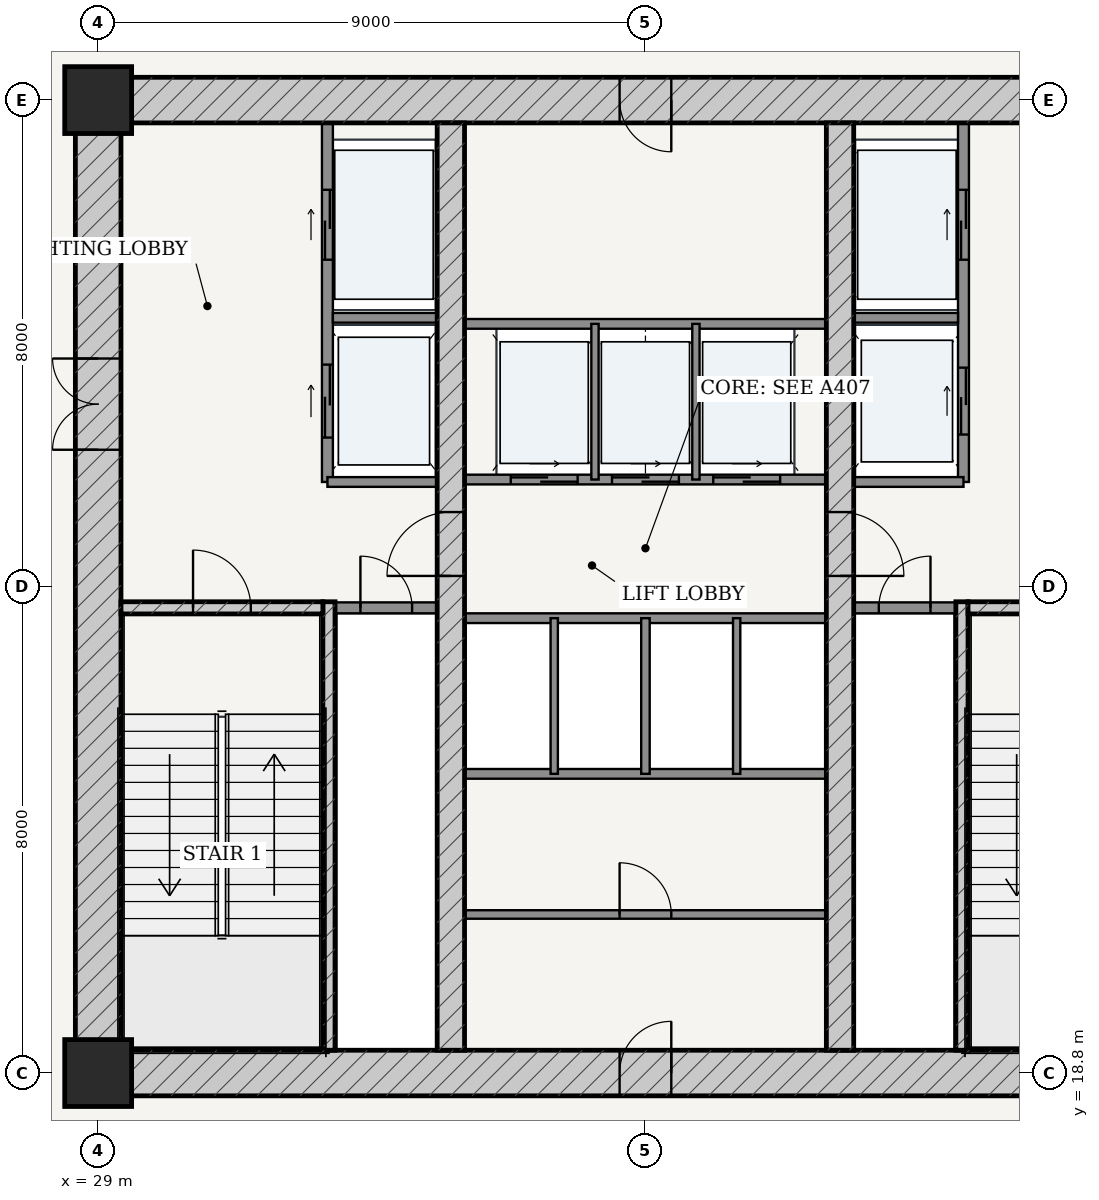
"""IFC4 building model, lengths in metres.
Left out: names, types, materials, properties, quantities, classifications, styles, units other than length and angle.
Written with IfcOpenShell. Run it as: python <this file> out.ifc"""

import sys

from ifc_helpers import new_model, si_unit, direction, frame, frame_2d, origin, origin_2d, place, context, subcontext, project, spatial, rectangle, extrude, source, transform, mapped, element, fill, save


model = new_model("IFC4")
c1 = context("Model", 3, precision=1e-05, world=origin(), true_north=direction((-0.2419218956, 0.970295726276)))
c2 = subcontext(c1, "Body", "Model", "MODEL_VIEW")
j1 = project(units=[si_unit("LENGTHUNIT", "METRE"), si_unit("PLANEANGLEUNIT", "RADIAN")], contexts=[c1])
p1 = place(None, origin())
s1 = spatial("IfcSite", under=j1, at=p1, CompositionType="ELEMENT")
p2 = place(p1, origin())
s2 = spatial("IfcBuilding", under=s1, at=p2, CompositionType="ELEMENT")
p3 = place(p2, frame((0.0, 0.0, 18.9)))
s3 = spatial("IfcBuildingStorey", under=s2, at=p3, CompositionType="ELEMENT", Elevation=18.9)
for number, where, z_axis, x_axis in (
    (1, (29.0, 18.8, 0.0), (0.0, 0.0, 1.0), (1.0, 0.0, 0.0)),
    (2, (29.0, 34.8, 0.0), (0.0, 0.0, 1.0), (1.0, 0.0, 0.0)),
):
    element("IfcColumn", number, at=place(p3, frame(where, z_axis=z_axis, x_axis=x_axis)), inside=s3, PredefinedType="COLUMN", context=c2, shape_type="SweptSolid", body=[
        extrude(rectangle(XDim=1.1, YDim=1.1, at=origin_2d()), origin(), (0.0, 0.0, 1.0), 5.1),
    ])
p4 = place(p3, frame((28.625, 18.8, 0.0), z_axis=(0.0, 0.0, 1.0), x_axis=(1.0, 0.0, 0.0)))
e3 = element("IfcWall", 3, at=p4, inside=s3, PredefinedType="SHEAR", context=c2, shape_type="SweptSolid", body=[
    extrude(rectangle(XDim=18.75, YDim=0.75, at=frame_2d((9.375, 0.0))), origin(), (0.0, 0.0, 1.0), 4.82),
])
p5 = place(p4, frame((8.95, 0.0, 0.0)))
e4 = element("IfcOpeningElement", 4, at=p5, cuts=e3, PredefinedType="OPENING", context=c2, shape_type="SweptSolid", body=[
    extrude(rectangle(XDim=0.85, YDim=2.1, at=frame_2d((0.425, 1.05))), frame((0.0, 0.385, 0.0), z_axis=(0.0, -1.0, 0.0), x_axis=(1.0, 0.0, 0.0)), (0.0, 0.0, 1.0), 0.77),
])
p6 = place(p3, frame((28.625, 34.8, 0.0), z_axis=(0.0, 0.0, 1.0), x_axis=(1.0, 0.0, 0.0)))
e5 = element("IfcWall", 5, at=p6, inside=s3, PredefinedType="SHEAR", context=c2, shape_type="SweptSolid", body=[
    extrude(rectangle(XDim=18.75, YDim=0.75, at=frame_2d((9.375, 0.0))), origin(), (0.0, 0.0, 1.0), 4.82),
])
p7 = place(p6, frame((8.95, 0.0, 0.0)))
e6 = element("IfcOpeningElement", 6, at=p7, cuts=e5, PredefinedType="OPENING", context=c2, shape_type="SweptSolid", body=[
    extrude(rectangle(XDim=0.85, YDim=2.1, at=frame_2d((0.425, 1.05))), frame((0.0, 0.385, 0.0), z_axis=(0.0, -1.0, 0.0), x_axis=(1.0, 0.0, 0.0)), (0.0, 0.0, 1.0), 0.77),
])
p8 = place(p3, frame((29.0, 19.175, 0.0), z_axis=(0.0, 0.0, 1.0), x_axis=(0.0, 1.0, 0.0)))
e7 = element("IfcWall", 7, at=p8, inside=s3, PredefinedType="SHEAR", context=c2, shape_type="SweptSolid", body=[
    extrude(rectangle(XDim=15.25, YDim=0.75, at=frame_2d((7.625, 0.0))), origin(), (0.0, 0.0, 1.0), 4.82),
])
p9 = place(p8, frame((9.875, 0.0, 0.0)))
e8 = element("IfcOpeningElement", 8, at=p9, cuts=e7, PredefinedType="OPENING", context=c2, shape_type="SweptSolid", body=[
    extrude(rectangle(XDim=1.5, YDim=2.2, at=frame_2d((0.75, 1.1))), frame((0.0, 0.385, 0.0), z_axis=(0.0, -1.0, 0.0), x_axis=(1.0, 0.0, 0.0)), (0.0, 0.0, 1.0), 0.77),
])
p10 = place(p3, frame((32.795, 19.175, 0.0), z_axis=(0.0, 0.0, 1.0), x_axis=(0.0, 1.0, 0.0)))
e9 = element("IfcWall", 9, at=p10, inside=s3, PredefinedType="SOLIDWALL", context=c2, shape_type="SweptSolid", body=[
    extrude(rectangle(XDim=7.375, YDim=0.2, at=frame_2d((3.688, 0.0))), origin(), (0.0, 0.0, 1.0), 4.82),
])
p11 = place(p3, frame((29.375, 26.45, 0.0), z_axis=(0.0, 0.0, 1.0), x_axis=(1.0, 0.0, 0.0)))
e10 = element("IfcWall", 10, at=p11, inside=s3, PredefinedType="SOLIDWALL", context=c2, shape_type="SweptSolid", body=[
    extrude(rectangle(XDim=3.32, YDim=0.2, at=frame_2d((1.66, 0.0))), origin(), (0.0, 0.0, 1.0), 4.82),
])
p12 = place(p11, frame((1.185, 0.0, 0.0)))
e11 = element("IfcOpeningElement", 11, at=p12, cuts=e10, PredefinedType="OPENING", context=c2, shape_type="SweptSolid", body=[
    extrude(rectangle(XDim=0.95, YDim=2.15, at=frame_2d((0.475, 1.075))), frame((0.0, 0.11, 0.0), z_axis=(0.0, -1.0, 0.0), x_axis=(1.0, 0.0, 0.0)), (0.0, 0.0, 1.0), 0.22),
])
p13 = place(p3, frame((43.205, 19.175, 0.0), z_axis=(0.0, 0.0, 1.0), x_axis=(0.0, 1.0, 0.0)))
e12 = element("IfcWall", 12, at=p13, inside=s3, PredefinedType="SOLIDWALL", context=c2, shape_type="SweptSolid", body=[
    extrude(rectangle(XDim=7.375, YDim=0.2, at=frame_2d((3.688, 0.0))), origin(), (0.0, 0.0, 1.0), 4.82),
])
p14 = place(p3, frame((43.305, 26.45, 0.0), z_axis=(0.0, 0.0, 1.0), x_axis=(1.0, 0.0, 0.0)))
e13 = element("IfcWall", 13, at=p14, inside=s3, PredefinedType="SOLIDWALL", context=c2, shape_type="SweptSolid", body=[
    extrude(rectangle(XDim=3.32, YDim=0.2, at=frame_2d((1.66, 0.0))), origin(), (0.0, 0.0, 1.0), 4.82),
])
p15 = place(p14, frame((1.185, 0.0, 0.0)))
e14 = element("IfcOpeningElement", 14, at=p15, cuts=e13, PredefinedType="OPENING", context=c2, shape_type="SweptSolid", body=[
    extrude(rectangle(XDim=0.95, YDim=2.15, at=frame_2d((0.475, 1.075))), frame((0.0, 0.11, 0.0), z_axis=(0.0, -1.0, 0.0), x_axis=(1.0, 0.0, 0.0)), (0.0, 0.0, 1.0), 0.22),
])
p16 = place(p3, frame((34.8, 19.175, 0.0), z_axis=(0.0, 0.0, 1.0), x_axis=(0.0, 1.0, 0.0)))
e15 = element("IfcWall", 15, at=p16, inside=s3, PredefinedType="SHEAR", context=c2, shape_type="SweptSolid", body=[
    extrude(rectangle(XDim=15.25, YDim=0.45, at=frame_2d((7.625, 0.0))), origin(), (0.0, 0.0, 1.0), 4.82),
])
p17 = place(p16, frame((7.8, 0.0, 0.0)))
e16 = element("IfcOpeningElement", 16, at=p17, cuts=e15, PredefinedType="OPENING", context=c2, shape_type="SweptSolid", body=[
    extrude(rectangle(XDim=1.05, YDim=2.15, at=frame_2d((0.525, 1.075))), frame((0.0, 0.235, 0.0), z_axis=(0.0, -1.0, 0.0), x_axis=(1.0, 0.0, 0.0)), (0.0, 0.0, 1.0), 0.47),
])
p18 = place(p3, frame((41.2, 19.175, 0.0), z_axis=(0.0, 0.0, 1.0), x_axis=(0.0, 1.0, 0.0)))
e17 = element("IfcWall", 17, at=p18, inside=s3, PredefinedType="SHEAR", context=c2, shape_type="SweptSolid", body=[
    extrude(rectangle(XDim=15.25, YDim=0.45, at=frame_2d((7.625, 0.0))), origin(), (0.0, 0.0, 1.0), 4.82),
])
p19 = place(p18, frame((7.8, 0.0, 0.0)))
e18 = element("IfcOpeningElement", 18, at=p19, cuts=e17, PredefinedType="OPENING", context=c2, shape_type="SweptSolid", body=[
    extrude(rectangle(XDim=1.05, YDim=2.15, at=frame_2d((0.525, 1.075))), frame((0.0, 0.235, 0.0), z_axis=(0.0, -1.0, 0.0), x_axis=(1.0, 0.0, 0.0)), (0.0, 0.0, 1.0), 0.47),
])
p20 = place(p3, frame((32.9, 26.45, 0.0), z_axis=(0.0, 0.0, 1.0), x_axis=(1.0, 0.0, 0.0)))
e19 = element("IfcWall", 19, at=p20, inside=s3, PredefinedType="PARTITIONING", context=c2, shape_type="SweptSolid", body=[
    extrude(rectangle(XDim=1.675, YDim=0.18, at=frame_2d((0.837, 0.0))), origin(), (0.0, 0.0, 1.0), 4.82),
])
p21 = place(p20, frame((0.413, 0.0, 0.0)))
e20 = element("IfcOpeningElement", 20, at=p21, cuts=e19, PredefinedType="OPENING", context=c2, shape_type="SweptSolid", body=[
    extrude(rectangle(XDim=0.85, YDim=2.1, at=frame_2d((0.425, 1.05))), frame((0.0, 0.1, 0.0), z_axis=(0.0, -1.0, 0.0), x_axis=(1.0, 0.0, 0.0)), (0.0, 0.0, 1.0), 0.2),
])
p22 = place(p3, frame((41.425, 26.45, 0.0), z_axis=(0.0, 0.0, 1.0), x_axis=(1.0, 0.0, 0.0)))
e21 = element("IfcWall", 21, at=p22, inside=s3, PredefinedType="PARTITIONING", context=c2, shape_type="SweptSolid", body=[
    extrude(rectangle(XDim=1.675, YDim=0.18, at=frame_2d((0.837, 0.0))), origin(), (0.0, 0.0, 1.0), 4.82),
])
p23 = place(p22, frame((0.413, 0.0, 0.0)))
e22 = element("IfcOpeningElement", 22, at=p23, cuts=e21, PredefinedType="OPENING", context=c2, shape_type="SweptSolid", body=[
    extrude(rectangle(XDim=0.85, YDim=2.1, at=frame_2d((0.425, 1.05))), frame((0.0, 0.1, 0.0), z_axis=(0.0, -1.0, 0.0), x_axis=(1.0, 0.0, 0.0)), (0.0, 0.0, 1.0), 0.2),
])
p24 = place(p3, frame((32.77, 28.52, 0.0), z_axis=(0.0, 0.0, 1.0), x_axis=(0.0, 1.0, 0.0)))
e23 = element("IfcWall", 23, at=p24, inside=s3, PredefinedType="PARTITIONING", context=c2, shape_type="SweptSolid", body=[
    extrude(rectangle(XDim=5.905, YDim=0.18, at=frame_2d((2.953, 0.0))), origin(), (0.0, 0.0, 1.0), 4.82),
])
p25 = place(p24, frame((3.655, 0.0, 0.0)))
e24 = element("IfcOpeningElement", 24, at=p25, cuts=e23, PredefinedType="OPENING", context=c2, shape_type="SweptSolid", body=[
    extrude(rectangle(XDim=1.15, YDim=2.2, at=frame_2d((0.575, 1.1))), frame((0.0, 0.1, 0.0), z_axis=(0.0, -1.0, 0.0), x_axis=(1.0, 0.0, 0.0)), (0.0, 0.0, 1.0), 0.2),
])
p26 = place(p24, frame((0.73, 0.0, 0.0)))
e25 = element("IfcOpeningElement", 25, at=p26, cuts=e23, PredefinedType="OPENING", context=c2, shape_type="SweptSolid", body=[
    extrude(rectangle(XDim=1.2, YDim=2.25, at=frame_2d((0.6, 1.125))), frame((0.0, 0.1, 0.0), z_axis=(0.0, -1.0, 0.0), x_axis=(1.0, 0.0, 0.0)), (0.0, 0.0, 1.0), 0.2),
])
p27 = place(p3, frame((32.86, 31.22, 0.0), z_axis=(0.0, 0.0, 1.0), x_axis=(1.0, 0.0, 0.0)))
e26 = element("IfcWall", 26, at=p27, inside=s3, PredefinedType="PARTITIONING", context=c2, shape_type="SweptSolid", body=[
    extrude(rectangle(XDim=1.715, YDim=0.16, at=frame_2d((0.857, 0.0))), origin(), (0.0, 0.0, 1.0), 4.82),
])
p28 = place(p3, frame((32.77, 28.52, 0.0), z_axis=(0.0, 0.0, 1.0), x_axis=(1.0, 0.0, 0.0)))
e27 = element("IfcWall", 27, at=p28, inside=s3, PredefinedType="PARTITIONING", context=c2, shape_type="SweptSolid", body=[
    extrude(rectangle(XDim=1.805, YDim=0.16, at=frame_2d((0.902, 0.0))), origin(), (0.0, 0.0, 1.0), 4.82),
])
p29 = place(p3, frame((43.23, 28.52, 0.0), z_axis=(0.0, 0.0, 1.0), x_axis=(0.0, 1.0, 0.0)))
e28 = element("IfcWall", 28, at=p29, inside=s3, PredefinedType="PARTITIONING", context=c2, shape_type="SweptSolid", body=[
    extrude(rectangle(XDim=5.905, YDim=0.18, at=frame_2d((2.953, 0.0))), origin(), (0.0, 0.0, 1.0), 4.82),
])
p30 = place(p29, frame((3.655, 0.0, 0.0)))
e29 = element("IfcOpeningElement", 29, at=p30, cuts=e28, PredefinedType="OPENING", context=c2, shape_type="SweptSolid", body=[
    extrude(rectangle(XDim=1.15, YDim=2.2, at=frame_2d((0.575, 1.1))), frame((0.0, 0.1, 0.0), z_axis=(0.0, -1.0, 0.0), x_axis=(1.0, 0.0, 0.0)), (0.0, 0.0, 1.0), 0.2),
])
p31 = place(p29, frame((0.78, 0.0, 0.0)))
e30 = element("IfcOpeningElement", 30, at=p31, cuts=e28, PredefinedType="OPENING", context=c2, shape_type="SweptSolid", body=[
    extrude(rectangle(XDim=1.1, YDim=2.2, at=frame_2d((0.55, 1.1))), frame((0.0, 0.1, 0.0), z_axis=(0.0, -1.0, 0.0), x_axis=(1.0, 0.0, 0.0)), (0.0, 0.0, 1.0), 0.2),
])
p32 = place(p3, frame((41.425, 31.22, 0.0), z_axis=(0.0, 0.0, 1.0), x_axis=(1.0, 0.0, 0.0)))
e31 = element("IfcWall", 31, at=p32, inside=s3, PredefinedType="PARTITIONING", context=c2, shape_type="SweptSolid", body=[
    extrude(rectangle(XDim=1.715, YDim=0.16, at=frame_2d((0.857, 0.0))), origin(), (0.0, 0.0, 1.0), 4.82),
])
p33 = place(p3, frame((41.425, 28.52, 0.0), z_axis=(0.0, 0.0, 1.0), x_axis=(1.0, 0.0, 0.0)))
e32 = element("IfcWall", 32, at=p33, inside=s3, PredefinedType="PARTITIONING", context=c2, shape_type="SweptSolid", body=[
    extrude(rectangle(XDim=1.805, YDim=0.16, at=frame_2d((0.902, 0.0))), origin(), (0.0, 0.0, 1.0), 4.82),
])
p34 = place(p3, frame((35.025, 28.56, 0.0), z_axis=(0.0, 0.0, 1.0), x_axis=(1.0, 0.0, 0.0)))
e33 = element("IfcWall", 33, at=p34, inside=s3, PredefinedType="PARTITIONING", context=c2, shape_type="SweptSolid", body=[
    extrude(rectangle(XDim=5.95, YDim=0.16, at=frame_2d((2.975, 0.0))), origin(), (0.0, 0.0, 1.0), 4.82),
])
p35 = place(p34, frame((0.76, 0.0, 0.0)))
e34 = element("IfcOpeningElement", 34, at=p35, cuts=e33, PredefinedType="OPENING", context=c2, shape_type="SweptSolid", body=[
    extrude(rectangle(XDim=1.1, YDim=2.2, at=frame_2d((0.55, 1.1))), frame((0.0, 0.09, 0.0), z_axis=(0.0, -1.0, 0.0), x_axis=(1.0, 0.0, 0.0)), (0.0, 0.0, 1.0), 0.18),
])
p36 = place(p34, frame((2.425, 0.0, 0.0)))
e35 = element("IfcOpeningElement", 35, at=p36, cuts=e33, PredefinedType="OPENING", context=c2, shape_type="SweptSolid", body=[
    extrude(rectangle(XDim=1.1, YDim=2.2, at=frame_2d((0.55, 1.1))), frame((0.0, 0.09, 0.0), z_axis=(0.0, -1.0, 0.0), x_axis=(1.0, 0.0, 0.0)), (0.0, 0.0, 1.0), 0.18),
])
p37 = place(p34, frame((4.09, 0.0, 0.0)))
e36 = element("IfcOpeningElement", 36, at=p37, cuts=e33, PredefinedType="OPENING", context=c2, shape_type="SweptSolid", body=[
    extrude(rectangle(XDim=1.1, YDim=2.2, at=frame_2d((0.55, 1.1))), frame((0.0, 0.09, 0.0), z_axis=(0.0, -1.0, 0.0), x_axis=(1.0, 0.0, 0.0)), (0.0, 0.0, 1.0), 0.18),
])
p38 = place(p3, frame((35.025, 31.12, 0.0), z_axis=(0.0, 0.0, 1.0), x_axis=(1.0, 0.0, 0.0)))
e37 = element("IfcWall", 37, at=p38, inside=s3, PredefinedType="PARTITIONING", context=c2, shape_type="SweptSolid", body=[
    extrude(rectangle(XDim=5.95, YDim=0.16, at=frame_2d((2.975, 0.0))), origin(), (0.0, 0.0, 1.0), 4.82),
])
for number, where, z_axis, x_axis in (
    (38, (37.17, 28.56, 0.0), (0.0, 0.0, 1.0), (0.0, 1.0, 0.0)),
    (39, (38.83, 28.56, 0.0), (0.0, 0.0, 1.0), (0.0, 1.0, 0.0)),
):
    element("IfcWall", number, at=place(p3, frame(where, z_axis=z_axis, x_axis=x_axis)), inside=s3, PredefinedType="PARTITIONING", context=c2, shape_type="SweptSolid", body=[
        extrude(rectangle(XDim=2.56, YDim=0.12, at=frame_2d((1.28, 0.0))), origin(), (0.0, 0.0, 1.0), 4.82),
    ])
for number, where, z_axis, x_axis in (
    (40, (35.025, 26.28, 0.0), (0.0, 0.0, 1.0), (1.0, 0.0, 0.0)),
    (41, (35.025, 23.72, 0.0), (0.0, 0.0, 1.0), (1.0, 0.0, 0.0)),
):
    element("IfcWall", number, at=place(p3, frame(where, z_axis=z_axis, x_axis=x_axis)), inside=s3, PredefinedType="PARTITIONING", context=c2, shape_type="SweptSolid", body=[
        extrude(rectangle(XDim=5.95, YDim=0.16, at=frame_2d((2.975, 0.0))), origin(), (0.0, 0.0, 1.0), 4.82),
    ])
p39 = place(p3, frame((36.5, 23.72, 0.0), z_axis=(0.0, 0.0, 1.0), x_axis=(0.0, 1.0, 0.0)))
e42 = element("IfcWall", 42, at=p39, inside=s3, PredefinedType="PARTITIONING", context=c2, shape_type="SweptSolid", body=[
    extrude(rectangle(XDim=2.56, YDim=0.12, at=frame_2d((1.28, 0.0))), origin(), (0.0, 0.0, 1.0), 4.82),
])
p40 = place(p3, frame((38.0, 23.72, 0.0), z_axis=(0.0, 0.0, 1.0), x_axis=(0.0, 1.0, 0.0)))
e43 = element("IfcWall", 43, at=p40, inside=s3, PredefinedType="PARTITIONING", context=c2, shape_type="SweptSolid", body=[
    extrude(rectangle(XDim=2.56, YDim=0.14, at=frame_2d((1.28, 0.0))), origin(), (0.0, 0.0, 1.0), 4.82),
])
p41 = place(p3, frame((39.5, 23.72, 0.0), z_axis=(0.0, 0.0, 1.0), x_axis=(0.0, 1.0, 0.0)))
e44 = element("IfcWall", 44, at=p41, inside=s3, PredefinedType="PARTITIONING", context=c2, shape_type="SweptSolid", body=[
    extrude(rectangle(XDim=2.56, YDim=0.12, at=frame_2d((1.28, 0.0))), origin(), (0.0, 0.0, 1.0), 4.82),
])
p42 = place(p3, frame((35.025, 21.407, 0.0), z_axis=(0.0, 0.0, 1.0), x_axis=(1.0, 0.0, 0.0)))
e45 = element("IfcWall", 45, at=p42, inside=s3, PredefinedType="PARTITIONING", context=c2, shape_type="SweptSolid", body=[
    extrude(rectangle(XDim=5.95, YDim=0.14, at=frame_2d((2.975, 0.0))), origin(), (0.0, 0.0, 1.0), 4.82),
])
p43 = place(p42, frame((2.55, 0.0, 0.0)))
e46 = element("IfcOpeningElement", 46, at=p43, cuts=e45, PredefinedType="OPENING", context=c2, shape_type="SweptSolid", body=[
    extrude(rectangle(XDim=0.85, YDim=2.1, at=frame_2d((0.425, 1.05))), frame((0.0, 0.08, 0.0), z_axis=(0.0, -1.0, 0.0), x_axis=(1.0, 0.0, 0.0)), (0.0, 0.0, 1.0), 0.16),
])
m1 = source(origin(), c2, "Body", "SweptSolid", [
    extrude(rectangle(XDim=1.5, YDim=2.2, at=frame_2d((0.75, 1.1))), frame((0.0, 0.025, 0.0), z_axis=(0.0, -1.0, 0.0), x_axis=(1.0, 0.0, 0.0)), (0.0, 0.0, 1.0), 0.05),
])
p44 = place(p9, origin())
e47 = element("IfcDoor", 47, at=p44, inside=s3, OperationType="DOUBLE_DOOR_SINGLE_SWING", PredefinedType="DOOR", context=c2, shape_type="MappedRepresentation", body=[
    mapped(m1, transform((0.0, 0.0, 0.0), scale=1.0)),
])
fill(e8, e47)
m2 = source(origin(), c2, "Body", "SweptSolid", [
    extrude(rectangle(XDim=1.05, YDim=2.15, at=frame_2d((0.525, 1.075))), frame((0.0, 0.025, 0.0), z_axis=(0.0, -1.0, 0.0), x_axis=(1.0, 0.0, 0.0)), (0.0, 0.0, 1.0), 0.05),
])
p45 = place(p17, origin())
e48 = element("IfcDoor", 48, at=p45, inside=s3, OperationType="SINGLE_SWING_LEFT", PredefinedType="DOOR", context=c2, shape_type="MappedRepresentation", body=[
    mapped(m2, transform((0.0, 0.0, 0.0), scale=1.0)),
])
fill(e16, e48)
p46 = place(p19, frame((1.05, 0.0, 0.0), z_axis=(0.0, 0.0, 1.0), x_axis=(-1.0, 0.0, 0.0)))
e49 = element("IfcDoor", 49, at=p46, inside=s3, OperationType="SINGLE_SWING_RIGHT", PredefinedType="DOOR", context=c2, shape_type="MappedRepresentation", body=[
    mapped(m2, transform((0.0, 0.0, 0.0), scale=1.0)),
])
fill(e18, e49)
m3 = source(origin(), c2, "Body", "SweptSolid", [
    extrude(rectangle(XDim=0.95, YDim=2.15, at=frame_2d((0.475, 1.075))), frame((0.0, 0.025, 0.0), z_axis=(0.0, -1.0, 0.0), x_axis=(1.0, 0.0, 0.0)), (0.0, 0.0, 1.0), 0.05),
])
p47 = place(p12, origin())
e50 = element("IfcDoor", 50, at=p47, inside=s3, OperationType="SINGLE_SWING_LEFT", PredefinedType="DOOR", context=c2, shape_type="MappedRepresentation", body=[
    mapped(m3, transform((0.0, 0.0, 0.0), scale=1.0)),
])
fill(e11, e50)
m4 = source(origin(), c2, "Body", "SweptSolid", [
    extrude(rectangle(XDim=0.85, YDim=2.1, at=frame_2d((0.425, 1.05))), frame((0.0, 0.025, 0.0), z_axis=(0.0, -1.0, 0.0), x_axis=(1.0, 0.0, 0.0)), (0.0, 0.0, 1.0), 0.05),
])
p48 = place(p21, origin())
e51 = element("IfcDoor", 51, at=p48, inside=s3, OperationType="SINGLE_SWING_LEFT", PredefinedType="DOOR", context=c2, shape_type="MappedRepresentation", body=[
    mapped(m4, transform((0.0, 0.0, 0.0), scale=1.0)),
])
fill(e20, e51)
p49 = place(p23, origin())
e52 = element("IfcDoor", 52, at=p49, inside=s3, OperationType="SINGLE_SWING_RIGHT", PredefinedType="DOOR", context=c2, shape_type="MappedRepresentation", body=[
    mapped(m4, transform((0.0, 0.0, 0.0), scale=1.0)),
])
fill(e22, e52)
p50 = place(p7, frame((0.85, 0.0, 0.0), z_axis=(0.0, 0.0, 1.0), x_axis=(-1.0, 0.0, 0.0)))
e53 = element("IfcDoor", 53, at=p50, inside=s3, OperationType="SINGLE_SWING_LEFT", PredefinedType="DOOR", context=c2, shape_type="MappedRepresentation", body=[
    mapped(m4, transform((0.0, 0.0, 0.0), scale=1.0)),
])
fill(e6, e53)
p51 = place(p5, origin())
e54 = element("IfcDoor", 54, at=p51, inside=s3, OperationType="SINGLE_SWING_RIGHT", PredefinedType="DOOR", context=c2, shape_type="MappedRepresentation", body=[
    mapped(m4, transform((0.0, 0.0, 0.0), scale=1.0)),
])
fill(e4, e54)
p52 = place(p43, origin())
e55 = element("IfcDoor", 55, at=p52, inside=s3, OperationType="SINGLE_SWING_LEFT", PredefinedType="DOOR", context=c2, shape_type="MappedRepresentation", body=[
    mapped(m4, transform((0.0, 0.0, 0.0), scale=1.0)),
])
fill(e46, e55)
m5 = source(origin(), c2, "Body", "SweptSolid", [
    extrude(rectangle(XDim=1.15, YDim=2.2, at=frame_2d((0.575, 1.1))), frame((0.0, 0.025, 0.0), z_axis=(0.0, -1.0, 0.0), x_axis=(1.0, 0.0, 0.0)), (0.0, 0.0, 1.0), 0.05),
])
p53 = place(p25, origin())
e56 = element("IfcDoor", 56, at=p53, inside=s3, OperationType="DOUBLE_DOOR_SLIDING", PredefinedType="DOOR", context=c2, shape_type="MappedRepresentation", body=[
    mapped(m5, transform((0.0, 0.0, 0.0), scale=1.0)),
])
fill(e24, e56)
p54 = place(p30, origin())
e57 = element("IfcDoor", 57, at=p54, inside=s3, OperationType="DOUBLE_DOOR_SLIDING", PredefinedType="DOOR", context=c2, shape_type="MappedRepresentation", body=[
    mapped(m5, transform((0.0, 0.0, 0.0), scale=1.0)),
])
fill(e29, e57)
m6 = source(origin(), c2, "Body", "SweptSolid", [
    extrude(rectangle(XDim=1.2, YDim=2.25, at=frame_2d((0.6, 1.125))), frame((0.0, 0.025, 0.0), z_axis=(0.0, -1.0, 0.0), x_axis=(1.0, 0.0, 0.0)), (0.0, 0.0, 1.0), 0.05),
])
p55 = place(p26, origin())
e58 = element("IfcDoor", 58, at=p55, inside=s3, OperationType="DOUBLE_DOOR_SLIDING", PredefinedType="DOOR", context=c2, shape_type="MappedRepresentation", body=[
    mapped(m6, transform((0.0, 0.0, 0.0), scale=1.0)),
])
fill(e25, e58)
m7 = source(origin(), c2, "Body", "SweptSolid", [
    extrude(rectangle(XDim=1.1, YDim=2.2, at=frame_2d((0.55, 1.1))), frame((0.0, 0.025, 0.0), z_axis=(0.0, -1.0, 0.0), x_axis=(1.0, 0.0, 0.0)), (0.0, 0.0, 1.0), 0.05),
])
p56 = place(p31, origin())
e59 = element("IfcDoor", 59, at=p56, inside=s3, OperationType="DOUBLE_DOOR_SLIDING", PredefinedType="DOOR", context=c2, shape_type="MappedRepresentation", body=[
    mapped(m7, transform((0.0, 0.0, 0.0), scale=1.0)),
])
fill(e30, e59)
p57 = place(p35, origin())
e60 = element("IfcDoor", 60, at=p57, inside=s3, OperationType="DOUBLE_DOOR_SLIDING", PredefinedType="DOOR", context=c2, shape_type="MappedRepresentation", body=[
    mapped(m7, transform((0.0, 0.0, 0.0), scale=1.0)),
])
fill(e34, e60)
p58 = place(p36, origin())
e61 = element("IfcDoor", 61, at=p58, inside=s3, OperationType="DOUBLE_DOOR_SLIDING", PredefinedType="DOOR", context=c2, shape_type="MappedRepresentation", body=[
    mapped(m7, transform((0.0, 0.0, 0.0), scale=1.0)),
])
fill(e35, e61)
p59 = place(p37, origin())
e62 = element("IfcDoor", 62, at=p59, inside=s3, OperationType="DOUBLE_DOOR_SLIDING", PredefinedType="DOOR", context=c2, shape_type="MappedRepresentation", body=[
    mapped(m7, transform((0.0, 0.0, 0.0), scale=1.0)),
])
fill(e36, e62)
save(model, sys.argv[1])
